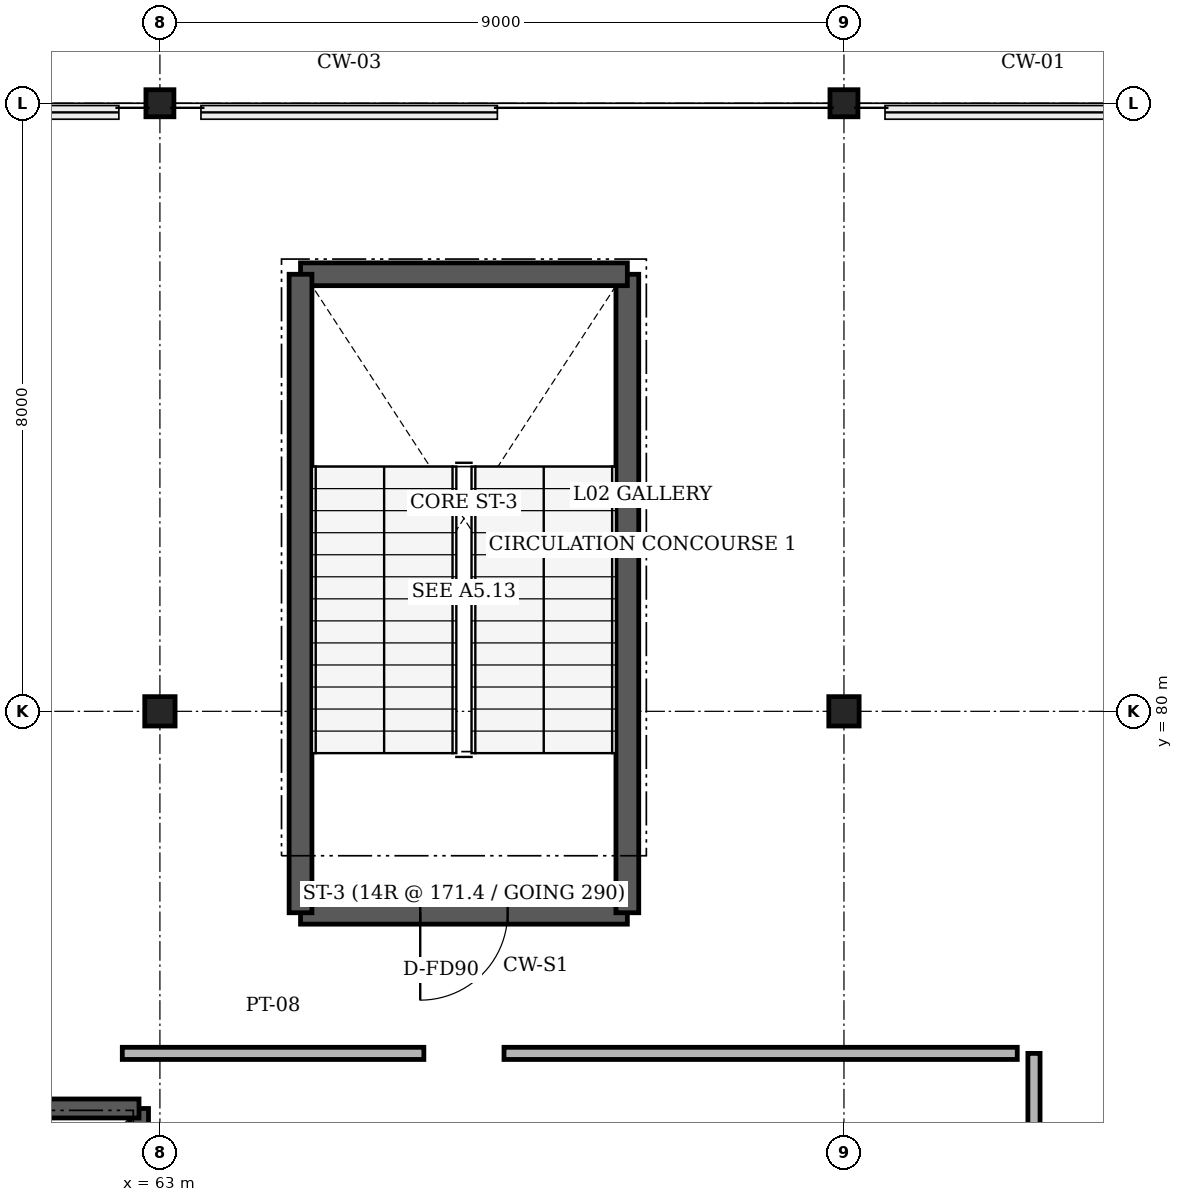
"""IFC4 building model, lengths in metres.
Left out: names, types, materials, properties, quantities, classifications, styles, units other than length and angle.
Written with IfcOpenShell. Run it as: python <this file> out.ifc"""

import sys

from ifc_helpers import new_model, si_unit, direction, frame, frame_2d, origin, origin_2d, place, context, subcontext, project, spatial, rectangle, i_section, extrude, element, fill, save


model = new_model("IFC4")
c1 = context("Model", 3, precision=1e-05, world=origin(), true_north=direction((0.0, 1.0)))
c2 = subcontext(c1, "Body", "Model", "MODEL_VIEW")
j1 = project(units=[si_unit("LENGTHUNIT", "METRE"), si_unit("PLANEANGLEUNIT", "RADIAN")], contexts=[c1])
p1 = place(None, origin())
s1 = spatial("IfcSite", under=j1, at=p1, CompositionType="ELEMENT")
p2 = place(p1, origin())
s2 = spatial("IfcBuilding", under=s1, at=p2, CompositionType="ELEMENT")
p3 = place(p2, frame((0.0, 0.0, 10.8)))
s3 = spatial("IfcBuildingStorey", under=s2, at=p3, CompositionType="ELEMENT", Elevation=10.8)
p4 = place(p3, frame((63.0, 80.0, 0.0), z_axis=(0.0, 0.0, 1.0), x_axis=(1.0, 0.0, 0.0)))
e1 = element("IfcColumn", 1, at=p4, inside=s3, PredefinedType="COLUMN", context=c2, shape_type="SweptSolid", body=[
    extrude(i_section(OverallWidth=0.399, OverallDepth=0.386, WebThickness=0.021, FlangeThickness=0.033, FilletRadius=0.015, at=origin_2d()), origin(), (0.0, 0.0, 1.0), 4.8),
])
p5 = place(p3, frame((63.0, 88.0, 0.0), z_axis=(0.0, 0.0, 1.0), x_axis=(1.0, 0.0, 0.0)))
e2 = element("IfcColumn", 2, at=p5, inside=s3, PredefinedType="COLUMN", context=c2, shape_type="SweptSolid", body=[
    extrude(i_section(OverallWidth=0.368, OverallDepth=0.356, WebThickness=0.011, FlangeThickness=0.018, FilletRadius=0.015, at=origin_2d()), origin(), (0.0, 0.0, 1.0), 4.8),
])
p6 = place(p3, frame((72.0, 80.0, 0.0), z_axis=(0.0, 0.0, 1.0), x_axis=(1.0, 0.0, 0.0)))
e3 = element("IfcColumn", 3, at=p6, inside=s3, PredefinedType="COLUMN", context=c2, shape_type="SweptSolid", body=[
    extrude(i_section(OverallWidth=0.399, OverallDepth=0.386, WebThickness=0.021, FlangeThickness=0.033, FilletRadius=0.015, at=origin_2d()), origin(), (0.0, 0.0, 1.0), 4.8),
])
p7 = place(p3, frame((72.0, 88.0, 0.0), z_axis=(0.0, 0.0, 1.0), x_axis=(1.0, 0.0, 0.0)))
e4 = element("IfcColumn", 4, at=p7, inside=s3, PredefinedType="COLUMN", context=c2, shape_type="SweptSolid", body=[
    extrude(i_section(OverallWidth=0.368, OverallDepth=0.356, WebThickness=0.011, FlangeThickness=0.018, FilletRadius=0.015, at=origin_2d()), origin(), (0.0, 0.0, 1.0), 4.8),
])
p8 = place(p3, frame((69.15, 77.35, 0.0), z_axis=(0.0, 0.0, 1.0), x_axis=(-1.0, 0.0, 0.0)))
e5 = element("IfcWall", 5, at=p8, inside=s3, PredefinedType="SOLIDWALL", context=c2, shape_type="SweptSolid", body=[
    extrude(rectangle(XDim=4.3, YDim=0.3, at=frame_2d((2.15, 0.0))), origin(), (0.0, 0.0, 1.0), 4.8),
])
p9 = place(p8, frame((1.575, 0.0, 0.0)))
e6 = element("IfcOpeningElement", 6, at=p9, cuts=e5, PredefinedType="OPENING", context=c2, shape_type="SweptSolid", body=[
    extrude(rectangle(XDim=1.15, YDim=2.2, at=frame_2d((0.575, 1.1))), frame((0.0, 0.16, 0.0), z_axis=(0.0, -1.0, 0.0), x_axis=(1.0, 0.0, 0.0)), (0.0, 0.0, 1.0), 0.32),
])
p10 = place(p3, frame((69.15, 77.35, 0.0), z_axis=(0.0, 0.0, 1.0), x_axis=(0.0, 1.0, 0.0)))
e7 = element("IfcWall", 7, at=p10, inside=s3, PredefinedType="SOLIDWALL", context=c2, shape_type="SweptSolid", body=[
    extrude(rectangle(XDim=8.4, YDim=0.3, at=frame_2d((4.2, 0.0))), origin(), (0.0, 0.0, 1.0), 4.8),
])
p11 = place(p3, frame((69.15, 85.75, 0.0), z_axis=(0.0, 0.0, 1.0), x_axis=(-1.0, 0.0, 0.0)))
e8 = element("IfcWall", 8, at=p11, inside=s3, PredefinedType="SOLIDWALL", context=c2, shape_type="SweptSolid", body=[
    extrude(rectangle(XDim=4.3, YDim=0.3, at=frame_2d((2.15, 0.0))), origin(), (0.0, 0.0, 1.0), 4.8),
])
p12 = place(p3, frame((64.85, 77.35, 0.0), z_axis=(0.0, 0.0, 1.0), x_axis=(0.0, 1.0, 0.0)))
e9 = element("IfcWall", 9, at=p12, inside=s3, PredefinedType="SOLIDWALL", context=c2, shape_type="SweptSolid", body=[
    extrude(rectangle(XDim=8.4, YDim=0.3, at=frame_2d((4.2, 0.0))), origin(), (0.0, 0.0, 1.0), 4.8),
])
p13 = place(p3, frame((62.725, 72.225, 0.0), z_axis=(0.0, 0.0, 1.0), x_axis=(0.0, 1.0, 0.0)))
e10 = element("IfcWall", 10, at=p13, inside=s3, PredefinedType="SOLIDWALL", context=c2, shape_type="SweptSolid", body=[
    extrude(rectangle(XDim=2.55, YDim=0.25, at=frame_2d((1.275, 0.0))), origin(), (0.0, 0.0, 1.0), 4.8),
])
p14 = place(p3, frame((62.725, 74.775, 0.0), z_axis=(0.0, 0.0, 1.0), x_axis=(-1.0, 0.0, 0.0)))
e11 = element("IfcWall", 11, at=p14, inside=s3, PredefinedType="SOLIDWALL", context=c2, shape_type="SweptSolid", body=[
    extrude(rectangle(XDim=2.45, YDim=0.25, at=frame_2d((1.225, 0.0))), origin(), (0.0, 0.0, 1.0), 4.8),
])
p15 = place(p3, frame((74.5, 75.5, 0.0), z_axis=(0.0, 0.0, 1.0), x_axis=(0.0, -1.0, 0.0)))
e12 = element("IfcWall", 12, at=p15, inside=s3, PredefinedType="PARTITIONING", context=c2, shape_type="SweptSolid", body=[
    extrude(rectangle(XDim=11.25, YDim=0.16, at=frame_2d((5.625, 0.0))), origin(), (0.0, 0.0, 1.0), 3.15),
])
p16 = place(p15, frame((4.725, 0.0, 0.0)))
e13 = element("IfcOpeningElement", 13, at=p16, cuts=e12, PredefinedType="OPENING", context=c2, shape_type="SweptSolid", body=[
    extrude(rectangle(XDim=1.8, YDim=2.3, at=frame_2d((0.9, 1.15))), frame((0.0, 0.09, 0.0), z_axis=(0.0, -1.0, 0.0), x_axis=(1.0, 0.0, 0.0)), (0.0, 0.0, 1.0), 0.18),
])
p17 = place(p3, frame((62.505, 75.5, 0.0), z_axis=(0.0, 0.0, 1.0), x_axis=(1.0, 0.0, 0.0)))
e14 = element("IfcWall", 14, at=p17, inside=s3, PredefinedType="PARTITIONING", context=c2, shape_type="SweptSolid", body=[
    extrude(rectangle(XDim=3.968, YDim=0.16, at=frame_2d((1.984, 0.0))), origin(), (0.0, 0.0, 1.0), 3.15),
])
p18 = place(p3, frame((67.527, 75.5, 0.0), z_axis=(0.0, 0.0, 1.0), x_axis=(1.0, 0.0, 0.0)))
e15 = element("IfcWall", 15, at=p18, inside=s3, PredefinedType="PARTITIONING", context=c2, shape_type="SweptSolid", body=[
    extrude(rectangle(XDim=6.753, YDim=0.16, at=frame_2d((3.376, 0.0))), origin(), (0.0, 0.0, 1.0), 3.15),
])
p19 = place(p9, origin())
e16 = element("IfcDoor", 16, at=p19, inside=s3, OperationType="SINGLE_SWING_RIGHT", PredefinedType="DOOR", context=c2, shape_type="SweptSolid", body=[
    extrude(rectangle(XDim=1.15, YDim=2.2, at=frame_2d((0.575, 1.1))), frame((0.0, 0.025, 0.0), z_axis=(0.0, -1.0, 0.0), x_axis=(1.0, 0.0, 0.0)), (0.0, 0.0, 1.0), 0.05),
])
fill(e6, e16)
save(model, sys.argv[1])
